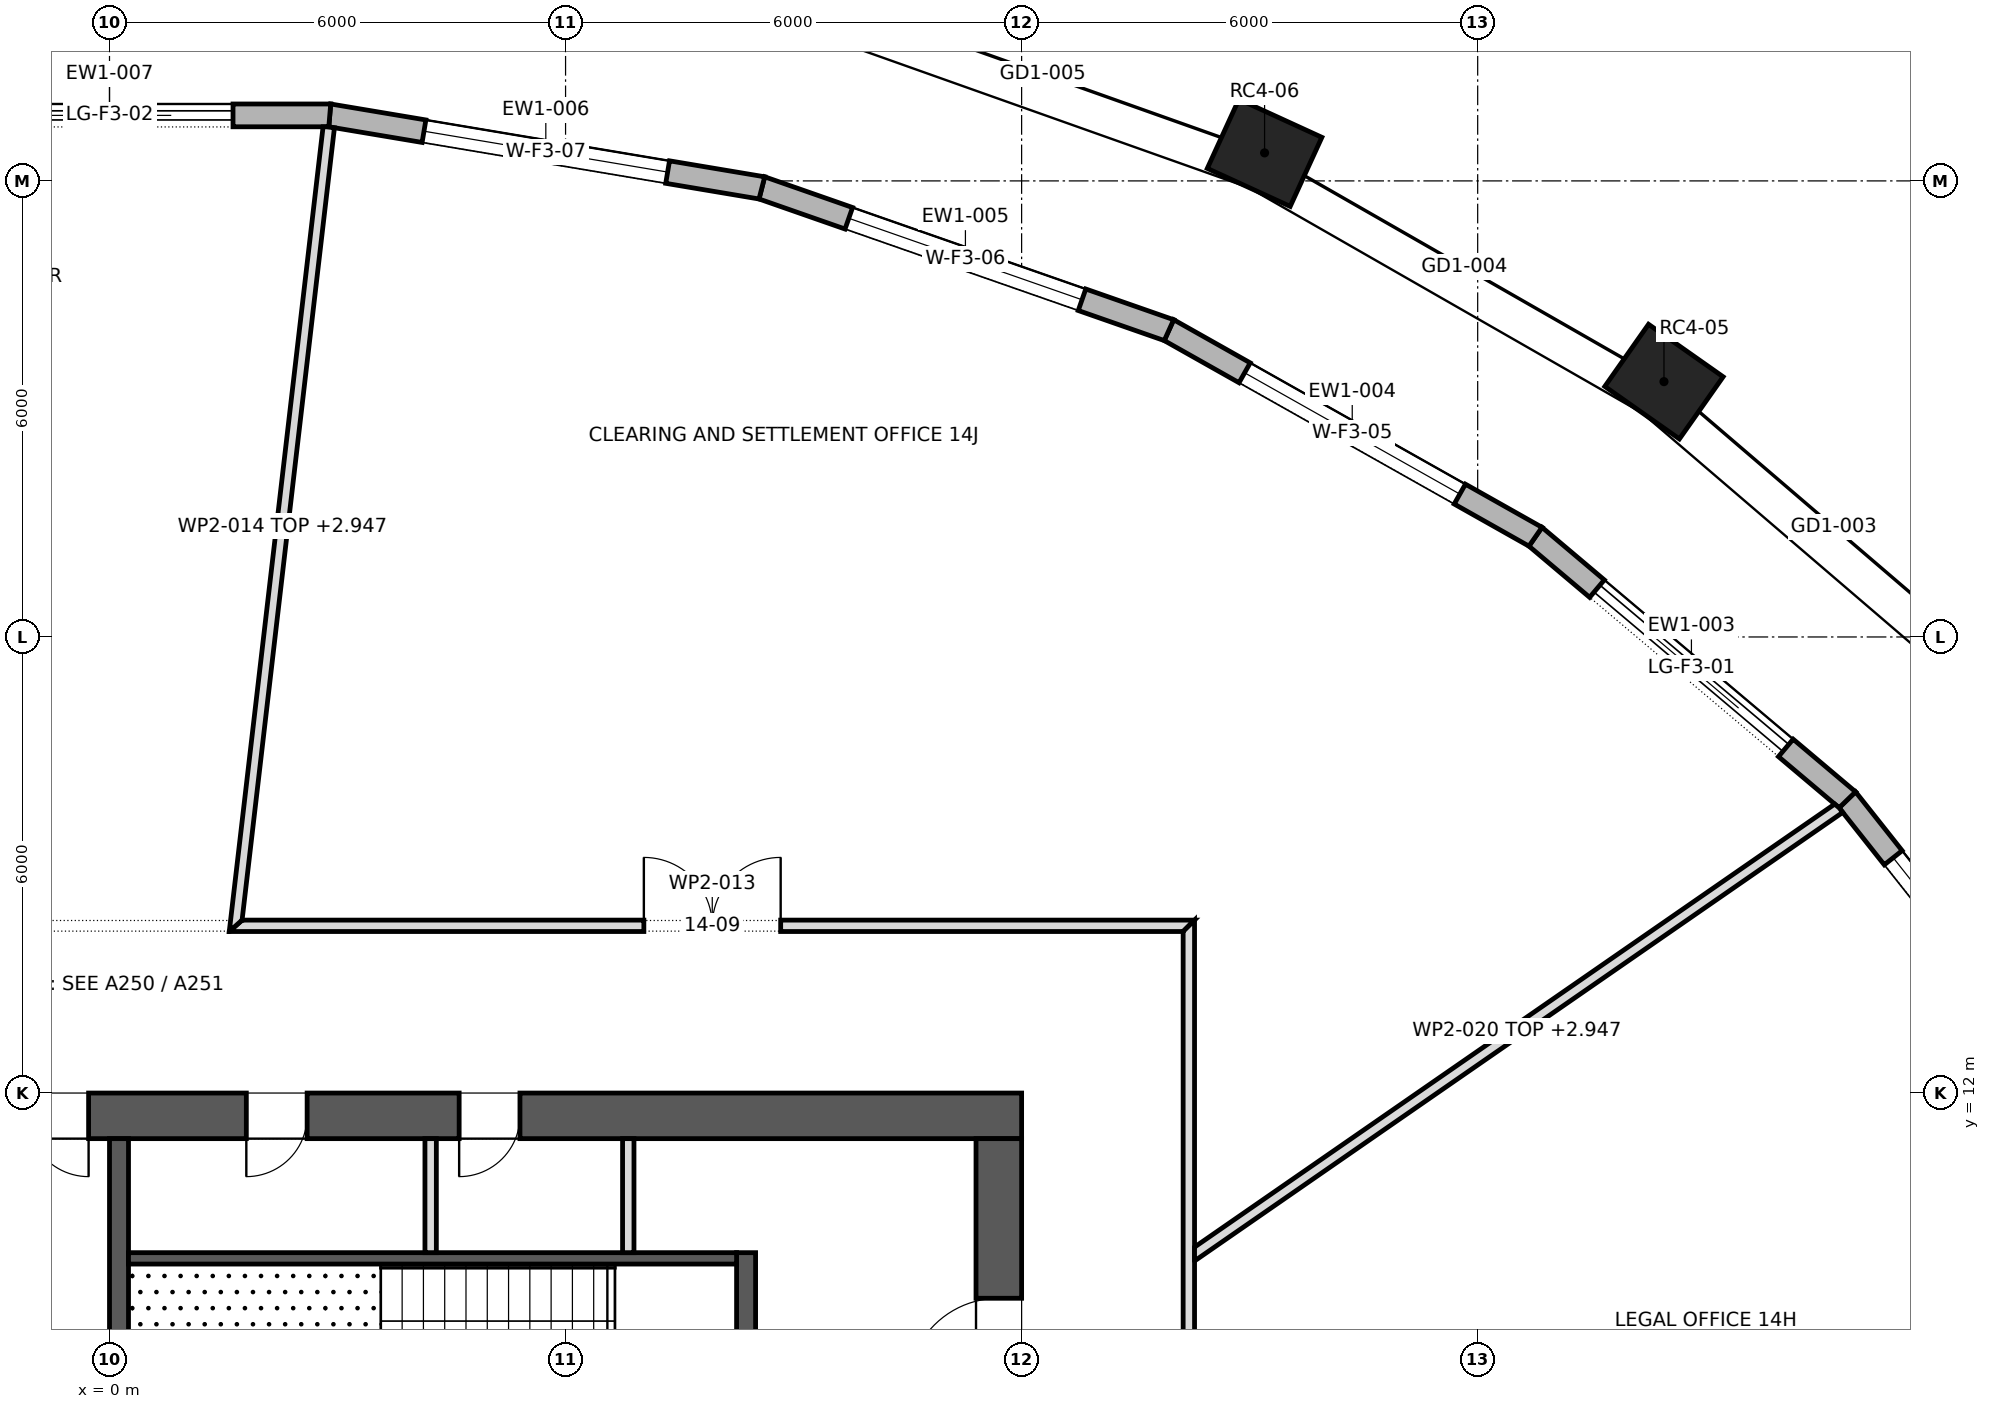
"""IFC4 building model, lengths in metres.
Left out: names, types, materials, properties, quantities, classifications, styles, units other than length and angle.
Written with IfcOpenShell. Run it as: python <this file> out.ifc"""

import sys

from ifc_helpers import new_model, si_unit, direction, frame, frame_2d, origin, origin_2d, place, context, subcontext, project, spatial, polyline, rectangle, outline, extrude, element, fill, save


model = new_model("IFC4")
c1 = context("Model", 3, precision=1e-05, world=origin(), true_north=direction((0.0, 1.0)))
c2 = subcontext(c1, "Body", "Model", "MODEL_VIEW")
j1 = project(units=[si_unit("LENGTHUNIT", "METRE"), si_unit("PLANEANGLEUNIT", "RADIAN")], contexts=[c1])
p1 = place(None, origin())
s1 = spatial("IfcSite", under=j1, at=p1, CompositionType="ELEMENT")
p2 = place(p1, origin())
s2 = spatial("IfcBuilding", under=s1, at=p2, CompositionType="ELEMENT")
p3 = place(p2, frame((0.0, 0.0, 202.9)))
s3 = spatial("IfcBuildingStorey", under=s2, at=p3, CompositionType="ELEMENT", Elevation=202.9)
for number, where, z_axis, x_axis in (
    (1, (20.451, 21.359, 0.0), (0.0, 0.0, 1.0), (-0.818, 0.575, 0.0)),
    (2, (15.196, 24.369, 0.0), (0.0, 0.0, 1.0), (-0.909, 0.417, 0.0)),
):
    element("IfcColumn", number, at=place(p3, frame(where, z_axis=z_axis, x_axis=x_axis)), inside=s3, PredefinedType="COLUMN", context=c2, shape_type="SweptSolid", body=[
        extrude(rectangle(XDim=1.2, YDim=1.0, at=origin_2d()), origin(), (0.0, 0.0, 1.0), 4.0),
    ])
p4 = place(p3, frame((-12.0, 11.7, 0.0), z_axis=(0.0, 0.0, 1.0), x_axis=(1.0, 0.0, 0.0)))
e3 = element("IfcWall", 3, at=p4, inside=s3, PredefinedType="SHEAR", context=c2, shape_type="SweptSolid", body=[
    extrude(rectangle(XDim=24.0, YDim=0.6, at=frame_2d((12.0, 0.0))), origin(), (0.0, 0.0, 1.0), 4.0),
])
p5 = place(p4, frame((9.225, 0.0, 0.0)))
e4 = element("IfcOpeningElement", 4, at=p5, cuts=e3, PredefinedType="OPENING", context=c2, shape_type="SweptSolid", body=[
    extrude(rectangle(XDim=0.9, YDim=2.1, at=frame_2d((0.45, 1.05))), frame((0.0, 0.312, 0.0), z_axis=(0.0, -1.0, 0.0), x_axis=(1.0, 0.0, 0.0)), (0.0, 0.0, 1.0), 0.624),
])
p6 = place(p4, frame((10.925, 0.0, 0.0)))
e5 = element("IfcOpeningElement", 5, at=p6, cuts=e3, PredefinedType="OPENING", context=c2, shape_type="SweptSolid", body=[
    extrude(rectangle(XDim=0.8, YDim=2.1, at=frame_2d((0.4, 1.05))), frame((0.0, 0.312, 0.0), z_axis=(0.0, -1.0, 0.0), x_axis=(1.0, 0.0, 0.0)), (0.0, 0.0, 1.0), 0.624),
])
p7 = place(p4, frame((4.2, 0.0, 0.0)))
e6 = element("IfcOpeningElement", 6, at=p7, cuts=e3, PredefinedType="OPENING", context=c2, shape_type="SweptSolid", body=[
    extrude(rectangle(XDim=0.8, YDim=2.1, at=frame_2d((0.4, 1.05))), frame((0.0, 0.312, 0.0), z_axis=(0.0, -1.0, 0.0), x_axis=(1.0, 0.0, 0.0)), (0.0, 0.0, 1.0), 0.624),
])
p8 = place(p4, frame((13.8, 0.0, 0.0)))
e7 = element("IfcOpeningElement", 7, at=p8, cuts=e3, PredefinedType="OPENING", context=c2, shape_type="SweptSolid", body=[
    extrude(rectangle(XDim=0.8, YDim=2.1, at=frame_2d((0.4, 1.05))), frame((0.0, 0.312, 0.0), z_axis=(0.0, -1.0, 0.0), x_axis=(1.0, 0.0, 0.0)), (0.0, 0.0, 1.0), 0.624),
])
p9 = place(p4, frame((16.6, 0.0, 0.0)))
e8 = element("IfcOpeningElement", 8, at=p9, cuts=e3, PredefinedType="OPENING", context=c2, shape_type="SweptSolid", body=[
    extrude(rectangle(XDim=0.8, YDim=2.1, at=frame_2d((0.4, 1.05))), frame((0.0, 0.312, 0.0), z_axis=(0.0, -1.0, 0.0), x_axis=(1.0, 0.0, 0.0)), (0.0, 0.0, 1.0), 0.624),
])
p10 = place(p3, frame((11.7, -11.4, 0.0), z_axis=(0.0, 0.0, 1.0), x_axis=(0.0, 1.0, 0.0)))
e9 = element("IfcWall", 9, at=p10, inside=s3, PredefinedType="SHEAR", context=c2, shape_type="SweptSolid", body=[
    extrude(rectangle(XDim=22.8, YDim=0.6, at=frame_2d((11.4, 0.0))), origin(), (0.0, 0.0, 1.0), 4.0),
])
p11 = place(p10, frame((10.2, 0.0, 0.0)))
e10 = element("IfcOpeningElement", 10, at=p11, cuts=e9, PredefinedType="OPENING", context=c2, shape_type="SweptSolid", body=[
    extrude(rectangle(XDim=2.4, YDim=2.1, at=frame_2d((1.2, 1.05))), frame((0.0, 0.312, 0.0), z_axis=(0.0, -1.0, 0.0), x_axis=(1.0, 0.0, 0.0)), (0.0, 0.0, 1.0), 0.624),
])
p12 = place(p10, frame((19.5, 0.0, 0.0)))
e11 = element("IfcOpeningElement", 11, at=p12, cuts=e9, PredefinedType="OPENING", context=c2, shape_type="SweptSolid", body=[
    extrude(rectangle(XDim=1.2, YDim=2.1, at=frame_2d((0.6, 1.05))), frame((0.0, 0.312, 0.0), z_axis=(0.0, -1.0, 0.0), x_axis=(1.0, 0.0, 0.0)), (0.0, 0.0, 1.0), 0.624),
])
p13 = place(p10, frame((2.1, 0.0, 0.0)))
e12 = element("IfcOpeningElement", 12, at=p13, cuts=e9, PredefinedType="OPENING", context=c2, shape_type="SweptSolid", body=[
    extrude(rectangle(XDim=1.2, YDim=2.1, at=frame_2d((0.6, 1.05))), frame((0.0, 0.312, 0.0), z_axis=(0.0, -1.0, 0.0), x_axis=(1.0, 0.0, 0.0)), (0.0, 0.0, 1.0), 0.624),
])
p14 = place(p3, frame((26.088, 11.786, 0.0), z_axis=(0.0, 0.0, 1.0), x_axis=(-0.620870264345, 0.783913333763, 0.0)))
e13 = element("IfcWall", 13, at=p14, inside=s3, PredefinedType="STANDARD", context=c2, shape_type="SweptSolid", body=[
    extrude(outline(polyline([(-0.016, -0.15), (5.21, -0.15), (5.179, 0.15), (0.016, 0.15), (-0.016, -0.15)])), origin(), (0.0, 0.0, 1.0), 3.7),
])
p15 = place(p14, frame((0.972, 0.0, 0.6)))
e14 = element("IfcOpeningElement", 14, at=p15, cuts=e13, PredefinedType="OPENING", context=c2, shape_type="SweptSolid", body=[
    extrude(rectangle(XDim=3.25, YDim=2.65, at=frame_2d((1.625, 1.325))), frame((0.0, 0.162, 0.0), z_axis=(0.0, -1.0, 0.0), x_axis=(1.0, 0.0, 0.0)), (0.0, 0.0, 1.0), 0.324),
])
p16 = place(p3, frame((22.863, 15.858, 0.0), z_axis=(0.0, 0.0, 1.0), x_axis=(-0.764386053229, 0.6447588399, 0.0)))
e15 = element("IfcWall", 15, at=p16, inside=s3, PredefinedType="STANDARD", context=c2, shape_type="SweptSolid", body=[
    extrude(outline(polyline([(-0.015, -0.15), (5.382, -0.15), (5.353, 0.15), (0.015, 0.15), (-0.015, -0.15)])), origin(), (0.0, 0.0, 1.0), 3.7),
])
p17 = place(p16, frame((1.059, 0.0, 0.0)))
e16 = element("IfcOpeningElement", 16, at=p17, cuts=e15, PredefinedType="OPENING", context=c2, shape_type="SweptSolid", body=[
    extrude(rectangle(XDim=3.25, YDim=3.25, at=frame_2d((1.625, 1.625))), frame((0.0, 0.162, 0.0), z_axis=(0.0, -1.0, 0.0), x_axis=(1.0, 0.0, 0.0)), (0.0, 0.0, 1.0), 0.324),
])
p18 = place(p3, frame((18.76, 19.319, 0.0), z_axis=(0.0, 0.0, 1.0), x_axis=(-0.871140546168, 0.491033755278, 0.0)))
e17 = element("IfcWall", 17, at=p18, inside=s3, PredefinedType="STANDARD", context=c2, shape_type="SweptSolid", body=[
    extrude(outline(polyline([(-0.014, -0.15), (5.549, -0.15), (5.522, 0.15), (0.014, 0.15), (-0.014, -0.15)])), origin(), (0.0, 0.0, 1.0), 3.7),
])
p19 = place(p18, frame((1.143, 0.0, 0.6)))
e18 = element("IfcOpeningElement", 18, at=p19, cuts=e17, PredefinedType="OPENING", context=c2, shape_type="SweptSolid", body=[
    extrude(rectangle(XDim=3.25, YDim=2.65, at=frame_2d((1.625, 1.325))), frame((0.0, 0.162, 0.0), z_axis=(0.0, -1.0, 0.0), x_axis=(1.0, 0.0, 0.0)), (0.0, 0.0, 1.0), 0.324),
])
p20 = place(p3, frame((13.938, 22.037, 0.0), z_axis=(0.0, 0.0, 1.0), x_axis=(-0.944023272224, 0.329878858824, 0.0)))
e19 = element("IfcWall", 19, at=p20, inside=s3, PredefinedType="STANDARD", context=c2, shape_type="SweptSolid", body=[
    extrude(outline(polyline([(-0.013, -0.15), (5.686, -0.15), (5.661, 0.15), (0.013, 0.15), (-0.013, -0.15)])), origin(), (0.0, 0.0, 1.0), 3.7),
])
p21 = place(p20, frame((1.212, 0.0, 0.6)))
e20 = element("IfcOpeningElement", 20, at=p21, cuts=e19, PredefinedType="OPENING", context=c2, shape_type="SweptSolid", body=[
    extrude(rectangle(XDim=3.25, YDim=2.65, at=frame_2d((1.625, 1.325))), frame((0.0, 0.162, 0.0), z_axis=(0.0, -1.0, 0.0), x_axis=(1.0, 0.0, 0.0)), (0.0, 0.0, 1.0), 0.324),
])
p22 = place(p3, frame((8.583, 23.908, 0.0), z_axis=(0.0, 0.0, 1.0), x_axis=(-0.98622052717, 0.165436005116, 0.0)))
e21 = element("IfcWall", 21, at=p22, inside=s3, PredefinedType="STANDARD", context=c2, shape_type="SweptSolid", body=[
    extrude(outline(polyline([(-0.013, -0.15), (5.777, -0.15), (5.752, 0.15), (0.013, 0.15), (-0.013, -0.15)])), origin(), (0.0, 0.0, 1.0), 3.7),
])
p23 = place(p22, frame((1.257, 0.0, 0.6)))
e22 = element("IfcOpeningElement", 22, at=p23, cuts=e21, PredefinedType="OPENING", context=c2, shape_type="SweptSolid", body=[
    extrude(rectangle(XDim=3.25, YDim=2.65, at=frame_2d((1.625, 1.325))), frame((0.0, 0.162, 0.0), z_axis=(0.0, -1.0, 0.0), x_axis=(1.0, 0.0, 0.0)), (0.0, 0.0, 1.0), 0.324),
])
p24 = place(p3, frame((2.898, 24.862, 0.0), z_axis=(0.0, 0.0, 1.0), x_axis=(-1.0, 0.0, 0.0)))
e23 = element("IfcWall", 23, at=p24, inside=s3, PredefinedType="STANDARD", context=c2, shape_type="SweptSolid", body=[
    extrude(outline(polyline([(-0.012, -0.15), (5.808, -0.15), (5.783, 0.15), (0.012, 0.15), (-0.012, -0.15)])), origin(), (0.0, 0.0, 1.0), 3.7),
])
p25 = place(p24, frame((1.273, 0.0, 0.0)))
e24 = element("IfcOpeningElement", 24, at=p25, cuts=e23, PredefinedType="OPENING", context=c2, shape_type="SweptSolid", body=[
    extrude(rectangle(XDim=3.25, YDim=3.25, at=frame_2d((1.625, 1.625))), frame((0.0, 0.162, 0.0), z_axis=(0.0, -1.0, 0.0), x_axis=(1.0, 0.0, 0.0)), (0.0, 0.0, 1.0), 0.324),
])
p26 = place(p3, frame((0.125, 6.5, 0.0), z_axis=(0.0, 0.0, 1.0), x_axis=(0.0, 1.0, 0.0)))
e25 = element("IfcWall", 25, at=p26, inside=s3, PredefinedType="SHEAR", context=c2, shape_type="SweptSolid", body=[
    extrude(rectangle(XDim=4.9, YDim=0.25, at=frame_2d((2.45, 0.0))), origin(), (0.0, 0.0, 1.0), 3.7),
])
p27 = place(p3, frame((8.375, 6.5, 0.0), z_axis=(0.0, 0.0, 1.0), x_axis=(0.0, 1.0, 0.0)))
e26 = element("IfcWall", 26, at=p27, inside=s3, PredefinedType="SHEAR", context=c2, shape_type="SweptSolid", body=[
    extrude(rectangle(XDim=3.4, YDim=0.25, at=frame_2d((1.7, 0.0))), origin(), (0.0, 0.0, 1.0), 3.7),
])
p28 = place(p27, frame((1.025, 0.0, 0.0)))
e27 = element("IfcOpeningElement", 27, at=p28, cuts=e26, PredefinedType="OPENING", context=c2, shape_type="SweptSolid", body=[
    extrude(rectangle(XDim=1.2, YDim=2.1, at=frame_2d((0.6, 1.05))), frame((0.0, 0.137, 0.0), z_axis=(0.0, -1.0, 0.0), x_axis=(1.0, 0.0, 0.0)), (0.0, 0.0, 1.0), 0.274),
])
p29 = place(p3, frame((0.25, 9.825, 0.0), z_axis=(0.0, 0.0, 1.0), x_axis=(1.0, 0.0, 0.0)))
e28 = element("IfcWall", 28, at=p29, inside=s3, PredefinedType="SHEAR", context=c2, shape_type="SweptSolid", body=[
    extrude(rectangle(XDim=8.0, YDim=0.15, at=frame_2d((4.0, 0.0))), origin(), (0.0, 0.0, 1.0), 3.7),
])
for number, where, z_axis, x_axis in (
    (29, (4.225, 9.9, 0.0), (0.0, 0.0, 1.0), (0.0, 1.0, 0.0)),
    (30, (6.825, 9.9, 0.0), (0.0, 0.0, 1.0), (0.0, 1.0, 0.0)),
):
    element("IfcWall", number, at=place(p3, frame(where, z_axis=z_axis, x_axis=x_axis)), inside=s3, PredefinedType="PARTITIONING", context=c2, shape_type="SweptSolid", body=[
        extrude(rectangle(XDim=1.5, YDim=0.15, at=frame_2d((0.75, 0.0))), origin(), (0.0, 0.0, 1.0), 3.7),
    ])
p30 = place(p3, frame((1.576, 14.2, 0.0), z_axis=(0.0, 0.0, 1.0), x_axis=(1.0, 0.0, 0.0)))
e31 = element("IfcWall", 31, at=p30, inside=s3, PredefinedType="PARTITIONING", context=c2, shape_type="SweptSolid", body=[
    extrude(outline(polyline([(0.0, -0.075), (1.793, -0.075), (3.585, -0.075), (5.378, -0.075), (7.171, -0.075), (8.964, -0.075), (10.757, -0.075), (12.549, -0.075), (12.699, 0.075), (10.909, 0.075), (9.119, 0.075), (7.329, 0.075), (5.539, 0.075), (3.749, 0.075), (1.958, 0.075), (0.168, 0.075), (0.0, -0.075)])), origin(), (0.0, 0.0, 1.0), 3.7),
])
p31 = place(p30, frame((5.454, 0.0, 0.0)))
e32 = element("IfcOpeningElement", 32, at=p31, cuts=e31, PredefinedType="OPENING", context=c2, shape_type="SweptSolid", body=[
    extrude(rectangle(XDim=1.8, YDim=2.1, at=frame_2d((0.9, 1.05))), frame((0.0, 0.087, 0.0), z_axis=(0.0, -1.0, 0.0), x_axis=(1.0, 0.0, 0.0)), (0.0, 0.0, 1.0), 0.174),
])
p32 = place(p3, frame((2.885, 24.708, 0.0), z_axis=(0.0, 0.0, 1.0), x_axis=(-0.115779808049, -0.99327490457, 0.0)))
e33 = element("IfcWall", 33, at=p32, inside=s3, PredefinedType="PARTITIONING", context=c2, shape_type="SweptSolid", body=[
    extrude(outline(polyline([(0.005, -0.075), (1.781, -0.075), (3.558, -0.075), (5.334, -0.075), (7.111, -0.075), (8.887, -0.075), (10.663, -0.075), (10.579, 0.0), (10.495, 0.075), (8.746, 0.075), (6.997, 0.075), (5.248, 0.075), (3.498, 0.075), (1.749, 0.075), (0.0, 0.075), (0.0, -0.034), (0.005, -0.075)])), origin(), (0.0, 0.0, 1.0), 2.947),
])
p33 = place(p3, frame((14.2, 1.098, 0.0), z_axis=(0.0, 0.0, 1.0), x_axis=(0.0, 1.0, 0.0)))
e34 = element("IfcWall", 34, at=p33, inside=s3, PredefinedType="PARTITIONING", context=c2, shape_type="SweptSolid", body=[
    extrude(outline(polyline([(0.163, -0.075), (2.022, -0.075), (3.881, -0.075), (5.74, -0.075), (7.599, -0.075), (9.458, -0.075), (11.317, -0.075), (13.177, -0.075), (13.027, 0.075), (11.166, 0.075), (9.305, 0.075), (7.444, 0.075), (5.583, 0.075), (3.722, 0.075), (1.861, 0.075), (0.0, 0.075), (0.163, -0.075)])), origin(), (0.0, 0.0, 1.0), 3.7),
])
p34 = place(p3, frame((14.232, 9.853, 0.0), z_axis=(0.0, 0.0, 1.0), x_axis=(0.822298116352, 0.569056946047, 0.0)))
e35 = element("IfcWall", 35, at=p34, inside=s3, PredefinedType="PARTITIONING", context=c2, shape_type="SweptSolid", body=[
    extrude(outline(polyline([(10.37, -0.075), (10.37, -0.07), (10.366, 0.002), (10.346, 0.075), (8.639, 0.075), (6.932, 0.075), (5.225, 0.075), (3.518, 0.075), (1.811, 0.075), (0.104, 0.075), (0.0, -0.075), (0.0, -0.075), (1.729, -0.075), (3.457, -0.075), (5.185, -0.075), (6.914, -0.075), (8.642, -0.075), (10.37, -0.075)])), origin(), (0.0, 0.0, 1.0), 2.947),
])
p35 = place(p15, origin())
e36 = element("IfcWindow", 36, at=p35, inside=s3, PartitioningType="TRIPLE_PANEL_VERTICAL", PredefinedType="WINDOW", context=c2, shape_type="SweptSolid", body=[
    extrude(rectangle(XDim=3.25, YDim=2.65, at=frame_2d((1.625, 1.325))), frame((0.0, 0.03, 0.0), z_axis=(0.0, -1.0, 0.0), x_axis=(1.0, 0.0, 0.0)), (0.0, 0.0, 1.0), 0.06),
])
fill(e14, e36)
p36 = place(p17, origin())
e37 = element("IfcDoor", 37, at=p36, inside=s3, OperationType="DOUBLE_DOOR_SLIDING", PredefinedType="DOOR", context=c2, shape_type="SweptSolid", body=[
    extrude(rectangle(XDim=3.25, YDim=3.25, at=frame_2d((1.625, 1.625))), frame((0.0, 0.025, 0.0), z_axis=(0.0, -1.0, 0.0), x_axis=(1.0, 0.0, 0.0)), (0.0, 0.0, 1.0), 0.05),
])
fill(e16, e37)
p37 = place(p19, origin())
e38 = element("IfcWindow", 38, at=p37, inside=s3, PartitioningType="TRIPLE_PANEL_VERTICAL", PredefinedType="WINDOW", context=c2, shape_type="SweptSolid", body=[
    extrude(rectangle(XDim=3.25, YDim=2.65, at=frame_2d((1.625, 1.325))), frame((0.0, 0.03, 0.0), z_axis=(0.0, -1.0, 0.0), x_axis=(1.0, 0.0, 0.0)), (0.0, 0.0, 1.0), 0.06),
])
fill(e18, e38)
p38 = place(p21, origin())
e39 = element("IfcWindow", 39, at=p38, inside=s3, PartitioningType="TRIPLE_PANEL_VERTICAL", PredefinedType="WINDOW", context=c2, shape_type="SweptSolid", body=[
    extrude(rectangle(XDim=3.25, YDim=2.65, at=frame_2d((1.625, 1.325))), frame((0.0, 0.03, 0.0), z_axis=(0.0, -1.0, 0.0), x_axis=(1.0, 0.0, 0.0)), (0.0, 0.0, 1.0), 0.06),
])
fill(e20, e39)
p39 = place(p23, origin())
e40 = element("IfcWindow", 40, at=p39, inside=s3, PartitioningType="TRIPLE_PANEL_VERTICAL", PredefinedType="WINDOW", context=c2, shape_type="SweptSolid", body=[
    extrude(rectangle(XDim=3.25, YDim=2.65, at=frame_2d((1.625, 1.325))), frame((0.0, 0.03, 0.0), z_axis=(0.0, -1.0, 0.0), x_axis=(1.0, 0.0, 0.0)), (0.0, 0.0, 1.0), 0.06),
])
fill(e22, e40)
p40 = place(p25, origin())
e41 = element("IfcDoor", 41, at=p40, inside=s3, OperationType="DOUBLE_DOOR_SLIDING", PredefinedType="DOOR", context=c2, shape_type="SweptSolid", body=[
    extrude(rectangle(XDim=3.25, YDim=3.25, at=frame_2d((1.625, 1.625))), frame((0.0, 0.025, 0.0), z_axis=(0.0, -1.0, 0.0), x_axis=(1.0, 0.0, 0.0)), (0.0, 0.0, 1.0), 0.05),
])
fill(e24, e41)
p41 = place(p12, origin())
e42 = element("IfcDoor", 42, at=p41, inside=s3, OperationType="SINGLE_SWING_RIGHT", PredefinedType="DOOR", context=c2, shape_type="SweptSolid", body=[
    extrude(rectangle(XDim=1.2, YDim=2.1, at=frame_2d((0.6, 1.05))), frame((0.0, 0.025, 0.0), z_axis=(0.0, -1.0, 0.0), x_axis=(1.0, 0.0, 0.0)), (0.0, 0.0, 1.0), 0.05),
])
fill(e11, e42)
p42 = place(p6, frame((0.8, 0.0, 0.0), z_axis=(0.0, 0.0, 1.0), x_axis=(-1.0, 0.0, 0.0)))
e43 = element("IfcDoor", 43, at=p42, inside=s3, OperationType="SINGLE_SWING_RIGHT", PredefinedType="DOOR", context=c2, shape_type="SweptSolid", body=[
    extrude(rectangle(XDim=0.8, YDim=2.1, at=frame_2d((0.4, 1.05))), frame((0.0, 0.025, 0.0), z_axis=(0.0, -1.0, 0.0), x_axis=(1.0, 0.0, 0.0)), (0.0, 0.0, 1.0), 0.05),
])
fill(e5, e43)
p43 = place(p8, frame((0.8, 0.0, 0.0), z_axis=(0.0, 0.0, 1.0), x_axis=(-1.0, 0.0, 0.0)))
e44 = element("IfcDoor", 44, at=p43, inside=s3, OperationType="SINGLE_SWING_LEFT", PredefinedType="DOOR", context=c2, shape_type="SweptSolid", body=[
    extrude(rectangle(XDim=0.8, YDim=2.1, at=frame_2d((0.4, 1.05))), frame((0.0, 0.025, 0.0), z_axis=(0.0, -1.0, 0.0), x_axis=(1.0, 0.0, 0.0)), (0.0, 0.0, 1.0), 0.05),
])
fill(e7, e44)
p44 = place(p9, frame((0.8, 0.0, 0.0), z_axis=(0.0, 0.0, 1.0), x_axis=(-1.0, 0.0, 0.0)))
e45 = element("IfcDoor", 45, at=p44, inside=s3, OperationType="SINGLE_SWING_LEFT", PredefinedType="DOOR", context=c2, shape_type="SweptSolid", body=[
    extrude(rectangle(XDim=0.8, YDim=2.1, at=frame_2d((0.4, 1.05))), frame((0.0, 0.025, 0.0), z_axis=(0.0, -1.0, 0.0), x_axis=(1.0, 0.0, 0.0)), (0.0, 0.0, 1.0), 0.05),
])
fill(e8, e45)
p45 = place(p31, origin())
e46 = element("IfcDoor", 46, at=p45, inside=s3, OperationType="DOUBLE_DOOR_SINGLE_SWING", PredefinedType="DOOR", context=c2, shape_type="SweptSolid", body=[
    extrude(rectangle(XDim=1.8, YDim=2.1, at=frame_2d((0.9, 1.05))), frame((0.0, 0.025, 0.0), z_axis=(0.0, -1.0, 0.0), x_axis=(1.0, 0.0, 0.0)), (0.0, 0.0, 1.0), 0.05),
])
fill(e32, e46)
save(model, sys.argv[1])
